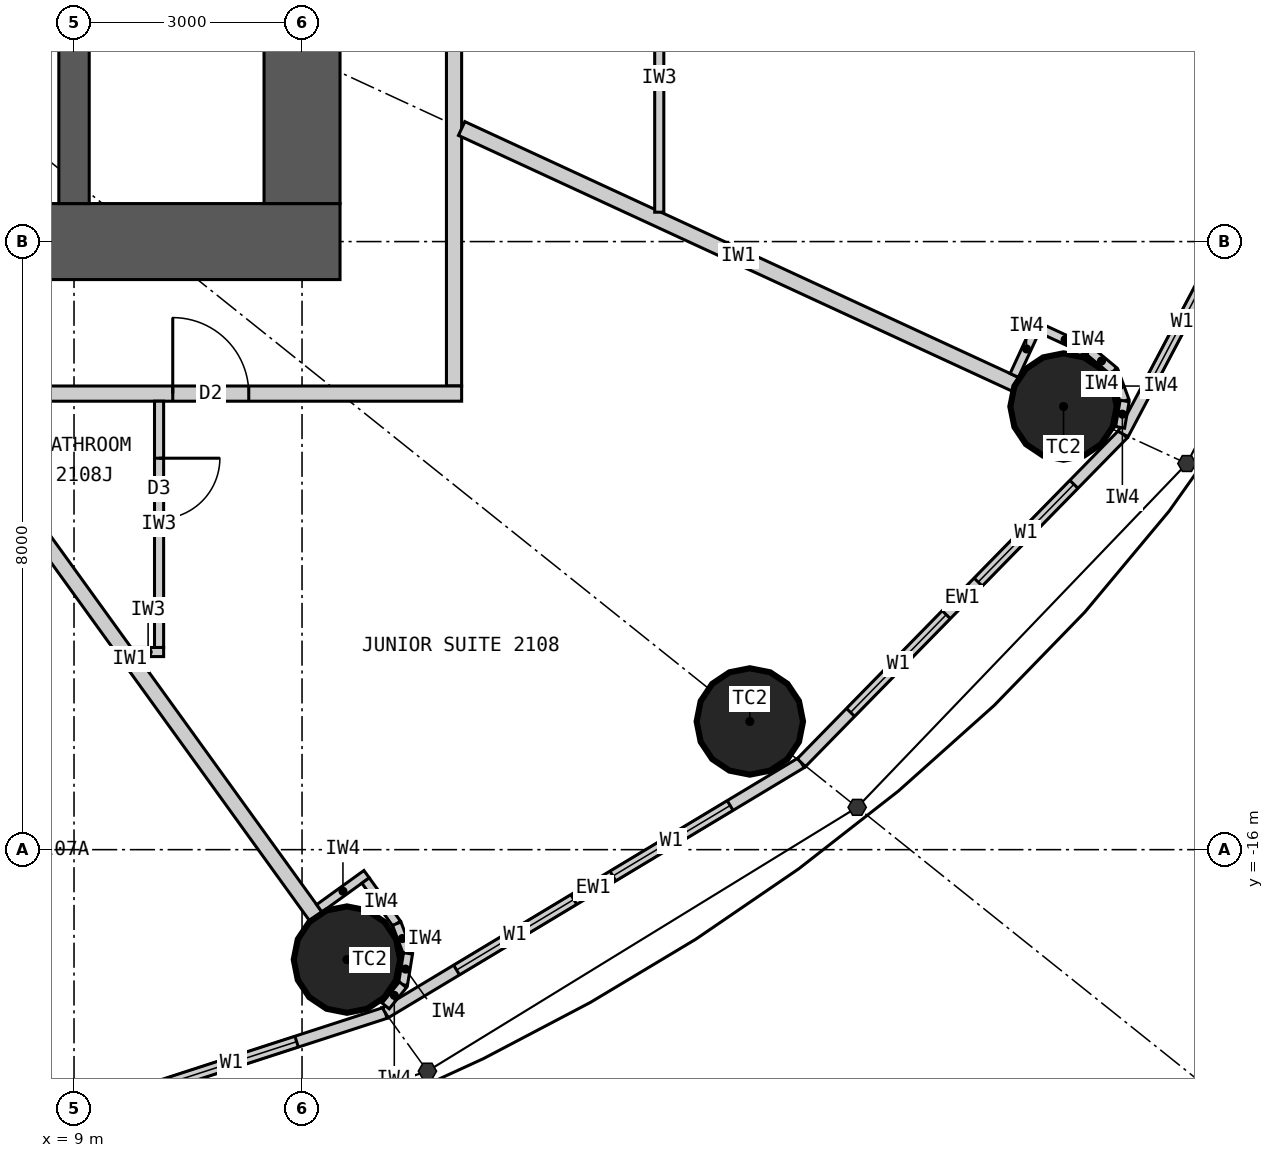
"""IFC4 building model, lengths in metres.
Left out: names, types, materials, properties, quantities, classifications, styles, units other than length and angle.
Written with IfcOpenShell. Run it as: python <this file> out.ifc"""

import sys

from ifc_helpers import new_model, si_unit, direction, frame, frame_2d, origin, origin_2d, place, context, subcontext, project, spatial, rectangle, circle, extrude, element, fill, save


model = new_model("IFC4")
c1 = context("Model", 3, precision=1e-05, world=origin(), true_north=direction((0.0, 1.0)))
c2 = subcontext(c1, "Body", "Model", "MODEL_VIEW")
j1 = project(units=[si_unit("LENGTHUNIT", "METRE"), si_unit("PLANEANGLEUNIT", "RADIAN")], contexts=[c1])
p1 = place(None, origin())
s1 = spatial("IfcSite", under=j1, at=p1, CompositionType="ELEMENT")
p2 = place(p1, origin())
s2 = spatial("IfcBuilding", under=s1, at=p2, CompositionType="ELEMENT")
p3 = place(p2, frame((0.0, 0.0, 83.7)))
s3 = spatial("IfcBuildingStorey", under=s2, at=p3, CompositionType="ELEMENT", Elevation=83.7)
for number, where, z_axis, x_axis in (
    (1, (12.591, -17.447, 0.0), (0.0, 0.0, 1.0), (1.0, 0.0, 0.0)),
    (2, (17.892, -14.313, 0.0), (0.0, 0.0, 1.0), (1.0, 0.0, 0.0)),
    (3, (22.019, -10.17, 0.0), (0.0, 0.0, 1.0), (1.0, 0.0, 0.0)),
):
    element("IfcColumn", number, at=place(p3, frame(where, z_axis=z_axis, x_axis=x_axis)), inside=s3, PredefinedType="COLUMN", context=c2, shape_type="SweptSolid", body=[
        extrude(circle(Radius=0.7, at=origin_2d()), origin(), (0.0, 0.0, 1.0), 3.3),
    ])
p4 = place(p3, frame((12.5, -8.0, 0.0), z_axis=(0.0, 0.0, 1.0), x_axis=(-1.0, 0.0, 0.0)))
e4 = element("IfcWall", 4, at=p4, inside=s3, PredefinedType="SHEAR", context=c2, shape_type="SweptSolid", body=[
    extrude(rectangle(XDim=25.0, YDim=1.0, at=frame_2d((12.5, 0.0))), origin(), (0.0, 0.0, 1.0), 3.3),
])
p5 = place(p4, frame((11.2, 0.0, 0.0)))
e5 = element("IfcOpeningElement", 5, at=p5, cuts=e4, PredefinedType="OPENING", context=c2, shape_type="SweptSolid", body=[
    extrude(rectangle(XDim=1.2, YDim=2.2, at=frame_2d((0.6, 1.1))), frame((0.0, 0.51, 0.0), z_axis=(0.0, -1.0, 0.0), x_axis=(1.0, 0.0, 0.0)), (0.0, 0.0, 1.0), 1.02),
])
p6 = place(p4, frame((18.8, 0.0, 0.0)))
e6 = element("IfcOpeningElement", 6, at=p6, cuts=e4, PredefinedType="OPENING", context=c2, shape_type="SweptSolid", body=[
    extrude(rectangle(XDim=0.9, YDim=2.2, at=frame_2d((0.45, 1.1))), frame((0.0, 0.51, 0.0), z_axis=(0.0, -1.0, 0.0), x_axis=(1.0, 0.0, 0.0)), (0.0, 0.0, 1.0), 1.02),
])
p7 = place(p3, frame((12.0, -7.5, 0.0), z_axis=(0.0, 0.0, 1.0), x_axis=(0.0, 1.0, 0.0)))
e7 = element("IfcWall", 7, at=p7, inside=s3, PredefinedType="SHEAR", context=c2, shape_type="SweptSolid", body=[
    extrude(rectangle(XDim=15.0, YDim=1.0, at=frame_2d((7.5, 0.0))), origin(), (0.0, 0.0, 1.0), 3.3),
])
p8 = place(p7, frame((6.6, 0.0, 0.0)))
e8 = element("IfcOpeningElement", 8, at=p8, cuts=e7, PredefinedType="OPENING", context=c2, shape_type="SweptSolid", body=[
    extrude(rectangle(XDim=1.8, YDim=2.2, at=frame_2d((0.9, 1.1))), frame((0.0, 0.51, 0.0), z_axis=(0.0, -1.0, 0.0), x_axis=(1.0, 0.0, 0.0)), (0.0, 0.0, 1.0), 1.02),
])
p9 = place(p3, frame((9.0, -7.5, 0.0), z_axis=(0.0, 0.0, 1.0), x_axis=(0.0, 1.0, 0.0)))
e9 = element("IfcWall", 9, at=p9, inside=s3, PredefinedType="SHEAR", context=c2, shape_type="SweptSolid", body=[
    extrude(rectangle(XDim=3.0, YDim=0.4, at=frame_2d((1.5, 0.0))), origin(), (0.0, 0.0, 1.0), 3.3),
])
p10 = place(p3, frame((6.766, -20.202, 0.0), z_axis=(0.0, 0.0, 1.0), x_axis=(0.951137534625, 0.308767534285, 0.0)))
e10 = element("IfcWall", 10, at=p10, inside=s3, PredefinedType="ELEMENTEDWALL", context=c2, shape_type="SweptSolid", body=[
    extrude(rectangle(XDim=6.655, YDim=0.15, at=frame_2d((3.328, 0.0))), origin(), (0.0, 0.0, 1.0), 3.12),
])
p11 = place(p10, frame((1.228, 0.0, 0.9)))
e11 = element("IfcOpeningElement", 11, at=p11, cuts=e10, PredefinedType="OPENING", context=c2, shape_type="SweptSolid", body=[
    extrude(rectangle(XDim=1.8, YDim=1.9, at=frame_2d((0.9, 0.95))), frame((0.0, 0.085, 0.0), z_axis=(0.0, -1.0, 0.0), x_axis=(1.0, 0.0, 0.0)), (0.0, 0.0, 1.0), 0.17),
])
p12 = place(p10, frame((3.628, 0.0, 0.9)))
e12 = element("IfcOpeningElement", 12, at=p12, cuts=e10, PredefinedType="OPENING", context=c2, shape_type="SweptSolid", body=[
    extrude(rectangle(XDim=1.8, YDim=1.9, at=frame_2d((0.9, 0.95))), frame((0.0, 0.085, 0.0), z_axis=(0.0, -1.0, 0.0), x_axis=(1.0, 0.0, 0.0)), (0.0, 0.0, 1.0), 0.17),
])
p13 = place(p3, frame((13.096, -18.147, 0.0), z_axis=(0.0, 0.0, 1.0), x_axis=(0.856983180864, 0.515344377787, 0.0)))
e13 = element("IfcWall", 13, at=p13, inside=s3, PredefinedType="ELEMENTEDWALL", context=c2, shape_type="SweptSolid", body=[
    extrude(rectangle(XDim=6.386, YDim=0.15, at=frame_2d((3.193, 0.0))), origin(), (0.0, 0.0, 1.0), 3.12),
])
p14 = place(p13, frame((1.093, 0.0, 0.9)))
e14 = element("IfcOpeningElement", 14, at=p14, cuts=e13, PredefinedType="OPENING", context=c2, shape_type="SweptSolid", body=[
    extrude(rectangle(XDim=1.8, YDim=1.9, at=frame_2d((0.9, 0.95))), frame((0.0, 0.085, 0.0), z_axis=(0.0, -1.0, 0.0), x_axis=(1.0, 0.0, 0.0)), (0.0, 0.0, 1.0), 0.17),
])
p15 = place(p13, frame((3.493, 0.0, 0.9)))
e15 = element("IfcOpeningElement", 15, at=p15, cuts=e13, PredefinedType="OPENING", context=c2, shape_type="SweptSolid", body=[
    extrude(rectangle(XDim=1.8, YDim=1.9, at=frame_2d((0.9, 0.95))), frame((0.0, 0.085, 0.0), z_axis=(0.0, -1.0, 0.0), x_axis=(1.0, 0.0, 0.0)), (0.0, 0.0, 1.0), 0.17),
])
p16 = place(p3, frame((18.57, -14.856, 0.0), z_axis=(0.0, 0.0, 1.0), x_axis=(0.699602905915, 0.714531856557, 0.0)))
e16 = element("IfcWall", 16, at=p16, inside=s3, PredefinedType="ELEMENTEDWALL", context=c2, shape_type="SweptSolid", body=[
    extrude(rectangle(XDim=6.051, YDim=0.15, at=frame_2d((3.025, 0.0))), origin(), (0.0, 0.0, 1.0), 3.12),
])
p17 = place(p16, frame((0.926, 0.0, 0.9)))
e17 = element("IfcOpeningElement", 17, at=p17, cuts=e16, PredefinedType="OPENING", context=c2, shape_type="SweptSolid", body=[
    extrude(rectangle(XDim=1.8, YDim=1.9, at=frame_2d((0.9, 0.95))), frame((0.0, 0.085, 0.0), z_axis=(0.0, -1.0, 0.0), x_axis=(1.0, 0.0, 0.0)), (0.0, 0.0, 1.0), 0.17),
])
p18 = place(p16, frame((3.325, 0.0, 0.9)))
e18 = element("IfcOpeningElement", 18, at=p18, cuts=e16, PredefinedType="OPENING", context=c2, shape_type="SweptSolid", body=[
    extrude(rectangle(XDim=1.8, YDim=1.9, at=frame_2d((0.9, 0.95))), frame((0.0, 0.085, 0.0), z_axis=(0.0, -1.0, 0.0), x_axis=(1.0, 0.0, 0.0)), (0.0, 0.0, 1.0), 0.17),
])
p19 = place(p3, frame((22.803, -10.532, 0.0), z_axis=(0.0, 0.0, 1.0), x_axis=(0.467296867008, 0.884100468321, 0.0)))
e19 = element("IfcWall", 19, at=p19, inside=s3, PredefinedType="ELEMENTEDWALL", context=c2, shape_type="SweptSolid", body=[
    extrude(rectangle(XDim=5.734, YDim=0.15, at=frame_2d((2.867, 0.0))), origin(), (0.0, 0.0, 1.0), 3.12),
])
p20 = place(p19, frame((0.767, 0.0, 0.9)))
e20 = element("IfcOpeningElement", 20, at=p20, cuts=e19, PredefinedType="OPENING", context=c2, shape_type="SweptSolid", body=[
    extrude(rectangle(XDim=1.8, YDim=1.9, at=frame_2d((0.9, 0.95))), frame((0.0, 0.085, 0.0), z_axis=(0.0, -1.0, 0.0), x_axis=(1.0, 0.0, 0.0)), (0.0, 0.0, 1.0), 0.17),
])
p21 = place(p19, frame((3.167, 0.0, 0.9)))
e21 = element("IfcOpeningElement", 21, at=p21, cuts=e19, PredefinedType="OPENING", context=c2, shape_type="SweptSolid", body=[
    extrude(rectangle(XDim=1.8, YDim=1.9, at=frame_2d((0.9, 0.95))), frame((0.0, 0.085, 0.0), z_axis=(0.0, -1.0, 0.0), x_axis=(1.0, 0.0, 0.0)), (0.0, 0.0, 1.0), 0.17),
])
p22 = place(p3, frame((14.0, -9.9, 0.0), z_axis=(0.0, 0.0, 1.0), x_axis=(0.0, 1.0, 0.0)))
e22 = element("IfcWall", 22, at=p22, inside=s3, PredefinedType="PARTITIONING", context=c2, shape_type="SweptSolid", body=[
    extrude(rectangle(XDim=19.8, YDim=0.2, at=frame_2d((9.9, 0.0))), origin(), (0.0, 0.0, 1.0), 3.12),
])
p23 = place(p22, frame((5.948, 0.0, 0.0)))
e23 = element("IfcOpeningElement", 23, at=p23, cuts=e22, PredefinedType="OPENING", context=c2, shape_type="SweptSolid", body=[
    extrude(rectangle(XDim=1.0, YDim=2.2, at=frame_2d((0.5, 1.1))), frame((0.0, 0.11, 0.0), z_axis=(0.0, -1.0, 0.0), x_axis=(1.0, 0.0, 0.0)), (0.0, 0.0, 1.0), 0.22),
])
p24 = place(p22, frame((11.46, 0.0, 0.0)))
e24 = element("IfcOpeningElement", 24, at=p24, cuts=e22, PredefinedType="OPENING", context=c2, shape_type="SweptSolid", body=[
    extrude(rectangle(XDim=1.0, YDim=2.2, at=frame_2d((0.5, 1.1))), frame((0.0, 0.11, 0.0), z_axis=(0.0, -1.0, 0.0), x_axis=(1.0, 0.0, 0.0)), (0.0, 0.0, 1.0), 0.22),
])
p25 = place(p3, frame((14.1, -10.0, 0.0), z_axis=(0.0, 0.0, 1.0), x_axis=(-1.0, 0.0, 0.0)))
e25 = element("IfcWall", 25, at=p25, inside=s3, PredefinedType="PARTITIONING", context=c2, shape_type="SweptSolid", body=[
    extrude(rectangle(XDim=28.2, YDim=0.2, at=frame_2d((14.1, 0.0))), origin(), (0.0, 0.0, 1.0), 3.12),
])
p26 = place(p25, frame((23.865, 0.0, 0.0)))
e26 = element("IfcOpeningElement", 26, at=p26, cuts=e25, PredefinedType="OPENING", context=c2, shape_type="SweptSolid", body=[
    extrude(rectangle(XDim=1.0, YDim=2.2, at=frame_2d((0.5, 1.1))), frame((0.0, 0.11, 0.0), z_axis=(0.0, -1.0, 0.0), x_axis=(1.0, 0.0, 0.0)), (0.0, 0.0, 1.0), 0.22),
])
p27 = place(p25, frame((18.529, 0.0, 0.0)))
e27 = element("IfcOpeningElement", 27, at=p27, cuts=e25, PredefinedType="OPENING", context=c2, shape_type="SweptSolid", body=[
    extrude(rectangle(XDim=1.0, YDim=2.2, at=frame_2d((0.5, 1.1))), frame((0.0, 0.11, 0.0), z_axis=(0.0, -1.0, 0.0), x_axis=(1.0, 0.0, 0.0)), (0.0, 0.0, 1.0), 0.22),
])
p28 = place(p25, frame((14.923, 0.0, 0.0)))
e28 = element("IfcOpeningElement", 28, at=p28, cuts=e25, PredefinedType="OPENING", context=c2, shape_type="SweptSolid", body=[
    extrude(rectangle(XDim=1.0, YDim=2.2, at=frame_2d((0.5, 1.1))), frame((0.0, 0.11, 0.0), z_axis=(0.0, -1.0, 0.0), x_axis=(1.0, 0.0, 0.0)), (0.0, 0.0, 1.0), 0.22),
])
p29 = place(p25, frame((2.801, 0.0, 0.0)))
e29 = element("IfcOpeningElement", 29, at=p29, cuts=e25, PredefinedType="OPENING", context=c2, shape_type="SweptSolid", body=[
    extrude(rectangle(XDim=1.0, YDim=2.2, at=frame_2d((0.5, 1.1))), frame((0.0, 0.11, 0.0), z_axis=(0.0, -1.0, 0.0), x_axis=(1.0, 0.0, 0.0)), (0.0, 0.0, 1.0), 0.22),
])
p30 = place(p3, frame((7.289, -10.1, 0.0), z_axis=(0.0, 0.0, 1.0), x_axis=(0.585198353053, -0.810890182197, 0.0)))
e30 = element("IfcWall", 30, at=p30, inside=s3, PredefinedType="PARTITIONING", context=c2, shape_type="SweptSolid", body=[
    extrude(rectangle(XDim=8.36, YDim=0.2, at=frame_2d((4.18, 0.0))), origin(), (0.0, 0.0, 1.0), 2.32),
])
p31 = place(p3, frame((14.1, -6.512, 0.0), z_axis=(0.0, 0.0, 1.0), x_axis=(0.907832871056, -0.419332181247, 0.0)))
e31 = element("IfcWall", 31, at=p31, inside=s3, PredefinedType="PARTITIONING", context=c2, shape_type="SweptSolid", body=[
    extrude(rectangle(XDim=8.023, YDim=0.2, at=frame_2d((4.011, 0.0))), origin(), (0.0, 0.0, 1.0), 2.32),
])
p32 = place(p3, frame((9.771, -13.4, 0.0), z_axis=(0.0, 0.0, 1.0), x_axis=(1.0, 0.0, 0.0)))
e32 = element("IfcWall", 32, at=p32, inside=s3, PredefinedType="PARTITIONING", context=c2, shape_type="SweptSolid", body=[
    extrude(rectangle(XDim=0.408, YDim=0.12, at=frame_2d((0.204, 0.0))), origin(), (0.0, 0.0, 1.0), 3.12),
])
p33 = place(p3, frame((10.119, -10.1, 0.0), z_axis=(0.0, 0.0, 1.0), x_axis=(0.0, -1.0, 0.0)))
e33 = element("IfcWall", 33, at=p33, inside=s3, PredefinedType="PARTITIONING", context=c2, shape_type="SweptSolid", body=[
    extrude(rectangle(XDim=3.24, YDim=0.12, at=frame_2d((1.62, 0.0))), origin(), (0.0, 0.0, 1.0), 3.12),
])
p34 = place(p33, frame((0.75, 0.0, 0.0)))
e34 = element("IfcOpeningElement", 34, at=p34, cuts=e33, PredefinedType="OPENING", context=c2, shape_type="SweptSolid", body=[
    extrude(rectangle(XDim=0.8, YDim=2.1, at=frame_2d((0.4, 1.05))), frame((0.0, 0.07, 0.0), z_axis=(0.0, -1.0, 0.0), x_axis=(1.0, 0.0, 0.0)), (0.0, 0.0, 1.0), 0.14),
])
p35 = place(p3, frame((16.7, -7.613, 0.0), z_axis=(0.0, 0.0, 1.0), x_axis=(0.0, 1.0, 0.0)))
e35 = element("IfcWall", 35, at=p35, inside=s3, PredefinedType="PARTITIONING", context=c2, shape_type="SweptSolid", body=[
    extrude(rectangle(XDim=3.541, YDim=0.12, at=frame_2d((1.771, 0.0))), origin(), (0.0, 0.0, 1.0), 3.12),
])
p36 = place(p3, frame((12.227, -16.772, 0.0), z_axis=(0.0, 0.0, 1.0), x_axis=(0.810821798253, 0.585293098778, 0.0)))
e36 = element("IfcWall", 36, at=p36, inside=s3, PredefinedType="PARTITIONING", context=c2, shape_type="SweptSolid", body=[
    extrude(rectangle(XDim=0.768, YDim=0.12, at=frame_2d((0.384, 0.0))), origin(), (0.0, 0.0, 1.0), 3.12),
])
p37 = place(p3, frame((12.836, -16.406, 0.0), z_axis=(0.0, 0.0, 1.0), x_axis=(0.585223113993, -0.810872312296, 0.0)))
e37 = element("IfcWall", 37, at=p37, inside=s3, PredefinedType="PARTITIONING", context=c2, shape_type="SweptSolid", body=[
    extrude(rectangle(XDim=0.7, YDim=0.12, at=frame_2d((0.35, 0.0))), origin(), (0.0, 0.0, 1.0), 3.12),
])
p38 = place(p3, frame((13.246, -16.974, 0.0), z_axis=(0.0, 0.0, 1.0), x_axis=(0.355728122235, -0.934589483705, 0.0)))
e38 = element("IfcWall", 38, at=p38, inside=s3, PredefinedType="PARTITIONING", context=c2, shape_type="SweptSolid", body=[
    extrude(rectangle(XDim=0.418, YDim=0.12, at=frame_2d((0.209, 0.0))), origin(), (0.0, 0.0, 1.0), 3.12),
])
p39 = place(p3, frame((13.394, -17.365, 0.0), z_axis=(0.0, 0.0, 1.0), x_axis=(-0.159379276926, -0.987217425943, 0.0)))
e39 = element("IfcWall", 39, at=p39, inside=s3, PredefinedType="PARTITIONING", context=c2, shape_type="SweptSolid", body=[
    extrude(rectangle(XDim=0.418, YDim=0.12, at=frame_2d((0.209, 0.0))), origin(), (0.0, 0.0, 1.0), 3.12),
])
p40 = place(p3, frame((13.328, -17.777, 0.0), z_axis=(0.0, 0.0, 1.0), x_axis=(-0.632276783541, -0.774742582407, 0.0)))
e40 = element("IfcWall", 40, at=p40, inside=s3, PredefinedType="PARTITIONING", context=c2, shape_type="SweptSolid", body=[
    extrude(rectangle(XDim=0.36, YDim=0.12, at=frame_2d((0.18, 0.0))), origin(), (0.0, 0.0, 1.0), 3.12),
])
p41 = place(p3, frame((21.371, -9.761, 0.0), z_axis=(0.0, 0.0, 1.0), x_axis=(0.419259891039, 0.907866258744, 0.0)))
e41 = element("IfcWall", 41, at=p41, inside=s3, PredefinedType="PARTITIONING", context=c2, shape_type="SweptSolid", body=[
    extrude(rectangle(XDim=0.768, YDim=0.12, at=frame_2d((0.384, 0.0))), origin(), (0.0, 0.0, 1.0), 3.12),
])
p42 = place(p3, frame((21.722, -9.144, 0.0), z_axis=(0.0, 0.0, 1.0), x_axis=(0.907877701396, -0.419235112208, 0.0)))
e42 = element("IfcWall", 42, at=p42, inside=s3, PredefinedType="PARTITIONING", context=c2, shape_type="SweptSolid", body=[
    extrude(rectangle(XDim=0.7, YDim=0.12, at=frame_2d((0.35, 0.0))), origin(), (0.0, 0.0, 1.0), 3.12),
])
p43 = place(p3, frame((22.358, -9.437, 0.0), z_axis=(0.0, 0.0, 1.0), x_axis=(0.768412687942, -0.639954639806, 0.0)))
e43 = element("IfcWall", 43, at=p43, inside=s3, PredefinedType="PARTITIONING", context=c2, shape_type="SweptSolid", body=[
    extrude(rectangle(XDim=0.418, YDim=0.12, at=frame_2d((0.209, 0.0))), origin(), (0.0, 0.0, 1.0), 3.12),
])
p44 = place(p3, frame((22.679, -9.705, 0.0), z_axis=(0.0, 0.0, 1.0), x_axis=(0.345164001646, -0.938542386879, 0.0)))
e44 = element("IfcWall", 44, at=p44, inside=s3, PredefinedType="PARTITIONING", context=c2, shape_type="SweptSolid", body=[
    extrude(rectangle(XDim=0.418, YDim=0.12, at=frame_2d((0.209, 0.0))), origin(), (0.0, 0.0, 1.0), 3.12),
])
p45 = place(p3, frame((22.823, -10.097, 0.0), z_axis=(0.0, 0.0, 1.0), x_axis=(-0.169674995186, -0.985500074079, 0.0)))
e45 = element("IfcWall", 45, at=p45, inside=s3, PredefinedType="PARTITIONING", context=c2, shape_type="SweptSolid", body=[
    extrude(rectangle(XDim=0.353, YDim=0.12, at=frame_2d((0.176, 0.0))), origin(), (0.0, 0.0, 1.0), 3.12),
])
p46 = place(p12, origin())
e46 = element("IfcWindow", 46, at=p46, inside=s3, PartitioningType="SINGLE_PANEL", PredefinedType="WINDOW", context=c2, shape_type="SweptSolid", body=[
    extrude(rectangle(XDim=1.8, YDim=1.9, at=frame_2d((0.9, 0.95))), frame((0.0, 0.03, 0.0), z_axis=(0.0, -1.0, 0.0), x_axis=(1.0, 0.0, 0.0)), (0.0, 0.0, 1.0), 0.06),
])
fill(e12, e46)
p47 = place(p14, origin())
e47 = element("IfcWindow", 47, at=p47, inside=s3, PartitioningType="SINGLE_PANEL", PredefinedType="WINDOW", context=c2, shape_type="SweptSolid", body=[
    extrude(rectangle(XDim=1.8, YDim=1.9, at=frame_2d((0.9, 0.95))), frame((0.0, 0.03, 0.0), z_axis=(0.0, -1.0, 0.0), x_axis=(1.0, 0.0, 0.0)), (0.0, 0.0, 1.0), 0.06),
])
fill(e14, e47)
p48 = place(p15, origin())
e48 = element("IfcWindow", 48, at=p48, inside=s3, PartitioningType="SINGLE_PANEL", PredefinedType="WINDOW", context=c2, shape_type="SweptSolid", body=[
    extrude(rectangle(XDim=1.8, YDim=1.9, at=frame_2d((0.9, 0.95))), frame((0.0, 0.03, 0.0), z_axis=(0.0, -1.0, 0.0), x_axis=(1.0, 0.0, 0.0)), (0.0, 0.0, 1.0), 0.06),
])
fill(e15, e48)
p49 = place(p17, origin())
e49 = element("IfcWindow", 49, at=p49, inside=s3, PartitioningType="SINGLE_PANEL", PredefinedType="WINDOW", context=c2, shape_type="SweptSolid", body=[
    extrude(rectangle(XDim=1.8, YDim=1.9, at=frame_2d((0.9, 0.95))), frame((0.0, 0.03, 0.0), z_axis=(0.0, -1.0, 0.0), x_axis=(1.0, 0.0, 0.0)), (0.0, 0.0, 1.0), 0.06),
])
fill(e17, e49)
p50 = place(p18, origin())
e50 = element("IfcWindow", 50, at=p50, inside=s3, PartitioningType="SINGLE_PANEL", PredefinedType="WINDOW", context=c2, shape_type="SweptSolid", body=[
    extrude(rectangle(XDim=1.8, YDim=1.9, at=frame_2d((0.9, 0.95))), frame((0.0, 0.03, 0.0), z_axis=(0.0, -1.0, 0.0), x_axis=(1.0, 0.0, 0.0)), (0.0, 0.0, 1.0), 0.06),
])
fill(e18, e50)
p51 = place(p20, origin())
e51 = element("IfcWindow", 51, at=p51, inside=s3, PartitioningType="SINGLE_PANEL", PredefinedType="WINDOW", context=c2, shape_type="SweptSolid", body=[
    extrude(rectangle(XDim=1.8, YDim=1.9, at=frame_2d((0.9, 0.95))), frame((0.0, 0.03, 0.0), z_axis=(0.0, -1.0, 0.0), x_axis=(1.0, 0.0, 0.0)), (0.0, 0.0, 1.0), 0.06),
])
fill(e20, e51)
p52 = place(p34, origin())
e52 = element("IfcDoor", 52, at=p52, inside=s3, OperationType="SINGLE_SWING_LEFT", PredefinedType="DOOR", context=c2, shape_type="SweptSolid", body=[
    extrude(rectangle(XDim=0.8, YDim=2.1, at=frame_2d((0.4, 1.05))), frame((0.0, 0.025, 0.0), z_axis=(0.0, -1.0, 0.0), x_axis=(1.0, 0.0, 0.0)), (0.0, 0.0, 1.0), 0.05),
])
fill(e34, e52)
p53 = place(p29, origin())
e53 = element("IfcDoor", 53, at=p53, inside=s3, OperationType="SINGLE_SWING_RIGHT", PredefinedType="DOOR", context=c2, shape_type="SweptSolid", body=[
    extrude(rectangle(XDim=1.0, YDim=2.2, at=frame_2d((0.5, 1.1))), frame((0.0, 0.025, 0.0), z_axis=(0.0, -1.0, 0.0), x_axis=(1.0, 0.0, 0.0)), (0.0, 0.0, 1.0), 0.05),
])
fill(e29, e53)
save(model, sys.argv[1])
